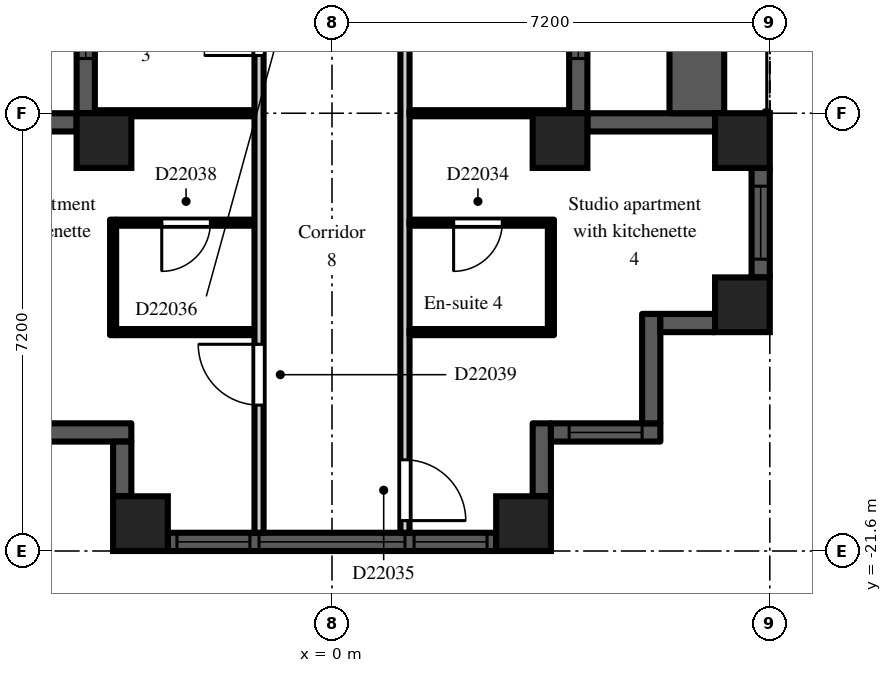
"""IFC4 building model, lengths in metres.
Left out: names, types, materials, properties, quantities, classifications, styles, units other than length and angle.
Written with IfcOpenShell. Run it as: python <this file> out.ifc"""

import sys

from ifc_helpers import new_model, si_unit, direction, frame, frame_2d, origin, origin_2d, place, context, subcontext, project, spatial, rectangle, extrude, element, fill, save


model = new_model("IFC4")
c1 = context("Model", 3, precision=1e-05, world=origin(), true_north=direction((0.0, 1.0)))
c2 = subcontext(c1, "Body", "Model", "MODEL_VIEW")
j1 = project(units=[si_unit("LENGTHUNIT", "METRE"), si_unit("PLANEANGLEUNIT", "RADIAN")], contexts=[c1])
p1 = place(None, origin())
s1 = spatial("IfcSite", under=j1, at=p1, CompositionType="ELEMENT")
p2 = place(p1, origin())
s2 = spatial("IfcBuilding", under=s1, at=p2, CompositionType="ELEMENT")
p3 = place(p2, frame((0.0, 0.0, 159.3)))
s3 = spatial("IfcBuildingStorey", under=s2, at=p3, CompositionType="ELEMENT", Elevation=159.3)
for number, where, z_axis, x_axis in (
    (1, (-3.75, -14.85, 0.0), (0.0, 0.0, 1.0), (1.0, 0.0, 0.0)),
    (2, (-3.15, -21.15, 0.0), (0.0, 0.0, 1.0), (1.0, 0.0, 0.0)),
    (3, (3.15, -21.15, 0.0), (0.0, 0.0, 1.0), (1.0, 0.0, 0.0)),
    (4, (3.75, -14.85, 0.0), (0.0, 0.0, 1.0), (1.0, 0.0, 0.0)),
    (5, (6.75, -17.55, 0.0), (0.0, 0.0, 1.0), (1.0, 0.0, 0.0)),
    (6, (6.75, -14.85, 0.0), (0.0, 0.0, 1.0), (1.0, 0.0, 0.0)),
):
    element("IfcColumn", number, at=place(p3, frame(where, z_axis=z_axis, x_axis=x_axis)), inside=s3, PredefinedType="COLUMN", context=c2, shape_type="SweptSolid", body=[
        extrude(rectangle(XDim=0.9, YDim=0.9, at=origin_2d()), origin(), (0.0, 0.0, 1.0), 3.0),
    ])
p4 = place(p3, frame((-4.05, -7.2, 0.0), z_axis=(0.0, 0.0, 1.0), x_axis=(0.0, -1.0, 0.0)))
e7 = element("IfcWall", 7, at=p4, inside=s3, PredefinedType="SOLIDWALL", context=c2, shape_type="SweptSolid", body=[
    extrude(rectangle(XDim=7.2, YDim=0.3, at=frame_2d((3.6, 0.0))), origin(), (0.0, 0.0, 1.0), 2.55),
])
p5 = place(p4, frame((3.0, 0.0, 0.0)))
e8 = element("IfcOpeningElement", 8, at=p5, cuts=e7, PredefinedType="OPENING", context=c2, shape_type="SweptSolid", body=[
    extrude(rectangle(XDim=1.2, YDim=2.05, at=frame_2d((0.6, 1.025))), frame((0.0, 0.16, 0.0), z_axis=(0.0, -1.0, 0.0), x_axis=(1.0, 0.0, 0.0)), (0.0, 0.0, 1.0), 0.32),
])
p6 = place(p4, frame((0.9, 0.0, 0.2)))
e9 = element("IfcOpeningElement", 9, at=p6, cuts=e7, PredefinedType="OPENING", context=c2, shape_type="SweptSolid", body=[
    extrude(rectangle(XDim=1.8, YDim=1.85, at=frame_2d((0.9, 0.925))), frame((0.0, 0.16, 0.0), z_axis=(0.0, -1.0, 0.0), x_axis=(1.0, 0.0, 0.0)), (0.0, 0.0, 1.0), 0.32),
])
p7 = place(p4, frame((4.5, 0.0, 0.2)))
e10 = element("IfcOpeningElement", 10, at=p7, cuts=e7, PredefinedType="OPENING", context=c2, shape_type="SweptSolid", body=[
    extrude(rectangle(XDim=1.8, YDim=1.85, at=frame_2d((0.9, 0.925))), frame((0.0, 0.16, 0.0), z_axis=(0.0, -1.0, 0.0), x_axis=(1.0, 0.0, 0.0)), (0.0, 0.0, 1.0), 0.32),
])
p8 = place(p3, frame((-4.2, -14.55, 0.0), z_axis=(0.0, 0.0, 1.0), x_axis=(-1.0, 0.0, 0.0)))
e11 = element("IfcWall", 11, at=p8, inside=s3, PredefinedType="SOLIDWALL", context=c2, shape_type="SweptSolid", body=[
    extrude(rectangle(XDim=2.1, YDim=0.3, at=frame_2d((1.05, 0.0))), origin(), (0.0, 0.0, 1.0), 2.55),
])
p9 = place(p3, frame((-5.1, -19.65, 0.0), z_axis=(0.0, 0.0, 1.0), x_axis=(1.0, 0.0, 0.0)))
e12 = element("IfcWall", 12, at=p9, inside=s3, PredefinedType="SOLIDWALL", context=c2, shape_type="SweptSolid", body=[
    extrude(rectangle(XDim=1.8, YDim=0.3, at=frame_2d((0.9, 0.0))), origin(), (0.0, 0.0, 1.0), 2.55),
])
p10 = place(p3, frame((-3.45, -19.8, 0.0), z_axis=(0.0, 0.0, 1.0), x_axis=(0.0, -1.0, 0.0)))
e13 = element("IfcWall", 13, at=p10, inside=s3, PredefinedType="SOLIDWALL", context=c2, shape_type="SweptSolid", body=[
    extrude(rectangle(XDim=0.9, YDim=0.3, at=frame_2d((0.45, 0.0))), origin(), (0.0, 0.0, 1.0), 2.55),
])
p11 = place(p3, frame((-2.7, -21.45, 0.0), z_axis=(0.0, 0.0, 1.0), x_axis=(1.0, 0.0, 0.0)))
e14 = element("IfcWall", 14, at=p11, inside=s3, PredefinedType="SOLIDWALL", context=c2, shape_type="SweptSolid", body=[
    extrude(rectangle(XDim=5.4, YDim=0.3, at=frame_2d((2.7, 0.0))), origin(), (0.0, 0.0, 1.0), 2.2),
])
p12 = place(p11, frame((1.5, 0.0, 0.2)))
e15 = element("IfcOpeningElement", 15, at=p12, cuts=e14, PredefinedType="OPENING", context=c2, shape_type="SweptSolid", body=[
    extrude(rectangle(XDim=2.4, YDim=1.85, at=frame_2d((1.2, 0.925))), frame((0.0, 0.16, 0.0), z_axis=(0.0, -1.0, 0.0), x_axis=(1.0, 0.0, 0.0)), (0.0, 0.0, 1.0), 0.32),
])
p13 = place(p11, frame((0.15, 0.0, 0.2)))
e16 = element("IfcOpeningElement", 16, at=p13, cuts=e14, PredefinedType="OPENING", context=c2, shape_type="SweptSolid", body=[
    extrude(rectangle(XDim=1.2, YDim=1.85, at=frame_2d((0.6, 0.925))), frame((0.0, 0.16, 0.0), z_axis=(0.0, -1.0, 0.0), x_axis=(1.0, 0.0, 0.0)), (0.0, 0.0, 1.0), 0.32),
])
p14 = place(p11, frame((4.05, 0.0, 0.2)))
e17 = element("IfcOpeningElement", 17, at=p14, cuts=e14, PredefinedType="OPENING", context=c2, shape_type="SweptSolid", body=[
    extrude(rectangle(XDim=1.2, YDim=1.85, at=frame_2d((0.6, 0.925))), frame((0.0, 0.16, 0.0), z_axis=(0.0, -1.0, 0.0), x_axis=(1.0, 0.0, 0.0)), (0.0, 0.0, 1.0), 0.32),
])
p15 = place(p3, frame((3.45, -20.7, 0.0), z_axis=(0.0, 0.0, 1.0), x_axis=(0.0, 1.0, 0.0)))
e18 = element("IfcWall", 18, at=p15, inside=s3, PredefinedType="SOLIDWALL", context=c2, shape_type="SweptSolid", body=[
    extrude(rectangle(XDim=1.2, YDim=0.3, at=frame_2d((0.6, 0.0))), origin(), (0.0, 0.0, 1.0), 2.55),
])
p16 = place(p3, frame((3.6, -19.65, 0.0), z_axis=(0.0, 0.0, 1.0), x_axis=(1.0, 0.0, 0.0)))
e19 = element("IfcWall", 19, at=p16, inside=s3, PredefinedType="SOLIDWALL", context=c2, shape_type="SweptSolid", body=[
    extrude(rectangle(XDim=1.8, YDim=0.3, at=frame_2d((0.9, 0.0))), origin(), (0.0, 0.0, 1.0), 2.55),
])
p17 = place(p16, frame((0.3, 0.0, 0.2)))
e20 = element("IfcOpeningElement", 20, at=p17, cuts=e19, PredefinedType="OPENING", context=c2, shape_type="SweptSolid", body=[
    extrude(rectangle(XDim=1.2, YDim=1.85, at=frame_2d((0.6, 0.925))), frame((0.0, 0.16, 0.0), z_axis=(0.0, -1.0, 0.0), x_axis=(1.0, 0.0, 0.0)), (0.0, 0.0, 1.0), 0.32),
])
p18 = place(p3, frame((5.25, -19.5, 0.0), z_axis=(0.0, 0.0, 1.0), x_axis=(0.0, 1.0, 0.0)))
e21 = element("IfcWall", 21, at=p18, inside=s3, PredefinedType="SOLIDWALL", context=c2, shape_type="SweptSolid", body=[
    extrude(rectangle(XDim=1.8, YDim=0.3, at=frame_2d((0.9, 0.0))), origin(), (0.0, 0.0, 1.0), 2.55),
])
p19 = place(p3, frame((5.4, -17.85, 0.0), z_axis=(0.0, 0.0, 1.0), x_axis=(1.0, 0.0, 0.0)))
e22 = element("IfcWall", 22, at=p19, inside=s3, PredefinedType="SOLIDWALL", context=c2, shape_type="SweptSolid", body=[
    extrude(rectangle(XDim=0.9, YDim=0.3, at=frame_2d((0.45, 0.0))), origin(), (0.0, 0.0, 1.0), 2.55),
])
p20 = place(p3, frame((7.05, -17.1, 0.0), z_axis=(0.0, 0.0, 1.0), x_axis=(0.0, 1.0, 0.0)))
e23 = element("IfcWall", 23, at=p20, inside=s3, PredefinedType="SOLIDWALL", context=c2, shape_type="SweptSolid", body=[
    extrude(rectangle(XDim=1.8, YDim=0.3, at=frame_2d((0.9, 0.0))), origin(), (0.0, 0.0, 1.0), 2.2),
])
p21 = place(p20, frame((0.3, 0.0, 0.2)))
e24 = element("IfcOpeningElement", 24, at=p21, cuts=e23, PredefinedType="OPENING", context=c2, shape_type="SweptSolid", body=[
    extrude(rectangle(XDim=1.2, YDim=1.85, at=frame_2d((0.6, 0.925))), frame((0.0, 0.16, 0.0), z_axis=(0.0, -1.0, 0.0), x_axis=(1.0, 0.0, 0.0)), (0.0, 0.0, 1.0), 0.32),
])
p22 = place(p3, frame((6.3, -14.55, 0.0), z_axis=(0.0, 0.0, 1.0), x_axis=(-1.0, 0.0, 0.0)))
e25 = element("IfcWall", 25, at=p22, inside=s3, PredefinedType="SOLIDWALL", context=c2, shape_type="SweptSolid", body=[
    extrude(rectangle(XDim=2.1, YDim=0.3, at=frame_2d((1.05, 0.0))), origin(), (0.0, 0.0, 1.0), 2.55),
])
p23 = place(p3, frame((4.05, -14.4, 0.0), z_axis=(0.0, 0.0, 1.0), x_axis=(0.0, 1.0, 0.0)))
e26 = element("IfcWall", 26, at=p23, inside=s3, PredefinedType="SOLIDWALL", context=c2, shape_type="SweptSolid", body=[
    extrude(rectangle(XDim=7.2, YDim=0.3, at=frame_2d((3.6, 0.0))), origin(), (0.0, 0.0, 1.0), 2.55),
])
p24 = place(p23, frame((3.0, 0.0, 0.0)))
e27 = element("IfcOpeningElement", 27, at=p24, cuts=e26, PredefinedType="OPENING", context=c2, shape_type="SweptSolid", body=[
    extrude(rectangle(XDim=1.2, YDim=2.05, at=frame_2d((0.6, 1.025))), frame((0.0, 0.16, 0.0), z_axis=(0.0, -1.0, 0.0), x_axis=(1.0, 0.0, 0.0)), (0.0, 0.0, 1.0), 0.32),
])
p25 = place(p23, frame((0.9, 0.0, 0.2)))
e28 = element("IfcOpeningElement", 28, at=p25, cuts=e26, PredefinedType="OPENING", context=c2, shape_type="SweptSolid", body=[
    extrude(rectangle(XDim=1.8, YDim=1.85, at=frame_2d((0.9, 0.925))), frame((0.0, 0.16, 0.0), z_axis=(0.0, -1.0, 0.0), x_axis=(1.0, 0.0, 0.0)), (0.0, 0.0, 1.0), 0.32),
])
p26 = place(p23, frame((4.5, 0.0, 0.2)))
e29 = element("IfcOpeningElement", 29, at=p26, cuts=e26, PredefinedType="OPENING", context=c2, shape_type="SweptSolid", body=[
    extrude(rectangle(XDim=1.8, YDim=1.85, at=frame_2d((0.9, 0.925))), frame((0.0, 0.16, 0.0), z_axis=(0.0, -1.0, 0.0), x_axis=(1.0, 0.0, 0.0)), (0.0, 0.0, 1.0), 0.32),
])
p27 = place(p3, frame((6.0, -14.4, 0.0), z_axis=(0.0, 0.0, 1.0), x_axis=(0.0, 1.0, 0.0)))
e30 = element("IfcWall", 30, at=p27, inside=s3, PredefinedType="PARAPET", context=c2, shape_type="SweptSolid", body=[
    extrude(rectangle(XDim=7.2, YDim=0.9, at=frame_2d((3.6, 0.0))), origin(), (0.0, 0.0, 1.0), 0.8),
])
p28 = place(p3, frame((-3.9, -14.4, 0.0), z_axis=(0.0, 0.0, 1.0), x_axis=(1.0, 0.0, 0.0)))
e31 = element("IfcWall", 31, at=p28, inside=s3, PredefinedType="PARTITIONING", context=c2, shape_type="SweptSolid", body=[
    extrude(rectangle(XDim=2.625, YDim=0.1, at=frame_2d((1.312, 0.0))), origin(), (0.0, 0.0, 1.0), 2.55),
])
p29 = place(p3, frame((-3.6, -18.05, 0.0), z_axis=(0.0, 0.0, 1.0), x_axis=(0.0, 1.0, 0.0)))
e32 = element("IfcWall", 32, at=p29, inside=s3, PredefinedType="PARTITIONING", context=c2, shape_type="SweptSolid", body=[
    extrude(rectangle(XDim=1.9, YDim=0.1, at=frame_2d((0.95, 0.0))), origin(), (0.0, 0.0, 1.0), 2.55),
])
p30 = place(p3, frame((-3.55, -18.0, 0.0), z_axis=(0.0, 0.0, 1.0), x_axis=(1.0, 0.0, 0.0)))
e33 = element("IfcWall", 33, at=p30, inside=s3, PredefinedType="PARTITIONING", context=c2, shape_type="SweptSolid", body=[
    extrude(rectangle(XDim=2.275, YDim=0.1, at=frame_2d((1.138, 0.0))), origin(), (0.0, 0.0, 1.0), 2.55),
])
p31 = place(p3, frame((-3.55, -16.2, 0.0), z_axis=(0.0, 0.0, 1.0), x_axis=(1.0, 0.0, 0.0)))
e34 = element("IfcWall", 34, at=p31, inside=s3, PredefinedType="PARTITIONING", context=c2, shape_type="SweptSolid", body=[
    extrude(rectangle(XDim=2.275, YDim=0.1, at=frame_2d((1.138, 0.0))), origin(), (0.0, 0.0, 1.0), 2.55),
])
p32 = place(p31, frame((0.75, 0.0, 0.0)))
e35 = element("IfcOpeningElement", 35, at=p32, cuts=e34, PredefinedType="OPENING", context=c2, shape_type="SweptSolid", body=[
    extrude(rectangle(XDim=0.8, YDim=2.1, at=frame_2d((0.4, 1.05))), frame((0.0, 0.06, 0.0), z_axis=(0.0, -1.0, 0.0), x_axis=(1.0, 0.0, 0.0)), (0.0, 0.0, 1.0), 0.12),
])
p33 = place(p3, frame((-1.2, -21.3, 0.0), z_axis=(0.0, 0.0, 1.0), x_axis=(0.0, 1.0, 0.0)))
e36 = element("IfcWall", 36, at=p33, inside=s3, PredefinedType="PARTITIONING", context=c2, shape_type="SweptSolid", body=[
    extrude(rectangle(XDim=14.025, YDim=0.15, at=frame_2d((7.013, 0.0))), origin(), (0.0, 0.0, 1.0), 2.55),
])
p34 = place(p33, frame((7.85, 0.0, 0.0)))
e37 = element("IfcOpeningElement", 37, at=p34, cuts=e36, PredefinedType="OPENING", context=c2, shape_type="SweptSolid", body=[
    extrude(rectangle(XDim=0.9, YDim=2.1, at=frame_2d((0.45, 1.05))), frame((0.0, 0.085, 0.0), z_axis=(0.0, -1.0, 0.0), x_axis=(1.0, 0.0, 0.0)), (0.0, 0.0, 1.0), 0.17),
])
p35 = place(p33, frame((11.45, 0.0, 0.0)))
e38 = element("IfcOpeningElement", 38, at=p35, cuts=e36, PredefinedType="OPENING", context=c2, shape_type="SweptSolid", body=[
    extrude(rectangle(XDim=0.9, YDim=2.1, at=frame_2d((0.45, 1.05))), frame((0.0, 0.085, 0.0), z_axis=(0.0, -1.0, 0.0), x_axis=(1.0, 0.0, 0.0)), (0.0, 0.0, 1.0), 0.17),
])
p36 = place(p33, frame((2.1, 0.0, 0.0)))
e39 = element("IfcOpeningElement", 39, at=p36, cuts=e36, PredefinedType="OPENING", context=c2, shape_type="SweptSolid", body=[
    extrude(rectangle(XDim=1.0, YDim=2.1, at=frame_2d((0.5, 1.05))), frame((0.0, 0.085, 0.0), z_axis=(0.0, -1.0, 0.0), x_axis=(1.0, 0.0, 0.0)), (0.0, 0.0, 1.0), 0.17),
])
p37 = place(p3, frame((1.2, -21.3, 0.0), z_axis=(0.0, 0.0, 1.0), x_axis=(0.0, 1.0, 0.0)))
e40 = element("IfcWall", 40, at=p37, inside=s3, PredefinedType="PARTITIONING", context=c2, shape_type="SweptSolid", body=[
    extrude(rectangle(XDim=14.175, YDim=0.15, at=frame_2d((7.087, 0.0))), origin(), (0.0, 0.0, 1.0), 2.55),
])
p38 = place(p37, frame((8.25, 0.0, 0.0)))
e41 = element("IfcOpeningElement", 41, at=p38, cuts=e40, PredefinedType="OPENING", context=c2, shape_type="SweptSolid", body=[
    extrude(rectangle(XDim=0.9, YDim=2.1, at=frame_2d((0.45, 1.05))), frame((0.0, 0.085, 0.0), z_axis=(0.0, -1.0, 0.0), x_axis=(1.0, 0.0, 0.0)), (0.0, 0.0, 1.0), 0.17),
])
p39 = place(p37, frame((0.2, 0.0, 0.0)))
e42 = element("IfcOpeningElement", 42, at=p39, cuts=e40, PredefinedType="OPENING", context=c2, shape_type="SweptSolid", body=[
    extrude(rectangle(XDim=1.0, YDim=2.1, at=frame_2d((0.5, 1.05))), frame((0.0, 0.085, 0.0), z_axis=(0.0, -1.0, 0.0), x_axis=(1.0, 0.0, 0.0)), (0.0, 0.0, 1.0), 0.17),
])
p40 = place(p3, frame((1.275, -18.0, 0.0), z_axis=(0.0, 0.0, 1.0), x_axis=(1.0, 0.0, 0.0)))
e43 = element("IfcWall", 43, at=p40, inside=s3, PredefinedType="PARTITIONING", context=c2, shape_type="SweptSolid", body=[
    extrude(rectangle(XDim=2.375, YDim=0.1, at=frame_2d((1.188, 0.0))), origin(), (0.0, 0.0, 1.0), 2.55),
])
p41 = place(p3, frame((1.275, -16.2, 0.0), z_axis=(0.0, 0.0, 1.0), x_axis=(1.0, 0.0, 0.0)))
e44 = element("IfcWall", 44, at=p41, inside=s3, PredefinedType="PARTITIONING", context=c2, shape_type="SweptSolid", body=[
    extrude(rectangle(XDim=2.375, YDim=0.1, at=frame_2d((1.188, 0.0))), origin(), (0.0, 0.0, 1.0), 2.55),
])
p42 = place(p41, frame((0.725, 0.0, 0.0)))
e45 = element("IfcOpeningElement", 45, at=p42, cuts=e44, PredefinedType="OPENING", context=c2, shape_type="SweptSolid", body=[
    extrude(rectangle(XDim=0.8, YDim=2.1, at=frame_2d((0.4, 1.05))), frame((0.0, 0.06, 0.0), z_axis=(0.0, -1.0, 0.0), x_axis=(1.0, 0.0, 0.0)), (0.0, 0.0, 1.0), 0.12),
])
p43 = place(p3, frame((1.275, -14.4, 0.0), z_axis=(0.0, 0.0, 1.0), x_axis=(1.0, 0.0, 0.0)))
e46 = element("IfcWall", 46, at=p43, inside=s3, PredefinedType="PARTITIONING", context=c2, shape_type="SweptSolid", body=[
    extrude(rectangle(XDim=2.625, YDim=0.1, at=frame_2d((1.312, 0.0))), origin(), (0.0, 0.0, 1.0), 2.55),
])
p44 = place(p3, frame((3.6, -17.95, 0.0), z_axis=(0.0, 0.0, 1.0), x_axis=(0.0, 1.0, 0.0)))
e47 = element("IfcWall", 47, at=p44, inside=s3, PredefinedType="PARTITIONING", context=c2, shape_type="SweptSolid", body=[
    extrude(rectangle(XDim=1.7, YDim=0.1, at=frame_2d((0.85, 0.0))), origin(), (0.0, 0.0, 1.0), 2.55),
])
p45 = place(p7, origin())
e48 = element("IfcWindow", 48, at=p45, inside=s3, PartitioningType="SINGLE_PANEL", PredefinedType="WINDOW", context=c2, shape_type="SweptSolid", body=[
    extrude(rectangle(XDim=1.8, YDim=1.85, at=frame_2d((0.9, 0.925))), frame((0.0, 0.03, 0.0), z_axis=(0.0, -1.0, 0.0), x_axis=(1.0, 0.0, 0.0)), (0.0, 0.0, 1.0), 0.06),
])
fill(e10, e48)
p46 = place(p12, origin())
e49 = element("IfcWindow", 49, at=p46, inside=s3, PartitioningType="SINGLE_PANEL", PredefinedType="WINDOW", context=c2, shape_type="SweptSolid", body=[
    extrude(rectangle(XDim=2.4, YDim=1.85, at=frame_2d((1.2, 0.925))), frame((0.0, 0.03, 0.0), z_axis=(0.0, -1.0, 0.0), x_axis=(1.0, 0.0, 0.0)), (0.0, 0.0, 1.0), 0.06),
])
fill(e15, e49)
p47 = place(p13, origin())
e50 = element("IfcWindow", 50, at=p47, inside=s3, PartitioningType="SINGLE_PANEL", PredefinedType="WINDOW", context=c2, shape_type="SweptSolid", body=[
    extrude(rectangle(XDim=1.2, YDim=1.85, at=frame_2d((0.6, 0.925))), frame((0.0, 0.03, 0.0), z_axis=(0.0, -1.0, 0.0), x_axis=(1.0, 0.0, 0.0)), (0.0, 0.0, 1.0), 0.06),
])
fill(e16, e50)
p48 = place(p14, origin())
e51 = element("IfcWindow", 51, at=p48, inside=s3, PartitioningType="SINGLE_PANEL", PredefinedType="WINDOW", context=c2, shape_type="SweptSolid", body=[
    extrude(rectangle(XDim=1.2, YDim=1.85, at=frame_2d((0.6, 0.925))), frame((0.0, 0.03, 0.0), z_axis=(0.0, -1.0, 0.0), x_axis=(1.0, 0.0, 0.0)), (0.0, 0.0, 1.0), 0.06),
])
fill(e17, e51)
p49 = place(p17, origin())
e52 = element("IfcWindow", 52, at=p49, inside=s3, PartitioningType="SINGLE_PANEL", PredefinedType="WINDOW", context=c2, shape_type="SweptSolid", body=[
    extrude(rectangle(XDim=1.2, YDim=1.85, at=frame_2d((0.6, 0.925))), frame((0.0, 0.03, 0.0), z_axis=(0.0, -1.0, 0.0), x_axis=(1.0, 0.0, 0.0)), (0.0, 0.0, 1.0), 0.06),
])
fill(e20, e52)
p50 = place(p21, origin())
e53 = element("IfcWindow", 53, at=p50, inside=s3, PartitioningType="SINGLE_PANEL", PredefinedType="WINDOW", context=c2, shape_type="SweptSolid", body=[
    extrude(rectangle(XDim=1.2, YDim=1.85, at=frame_2d((0.6, 0.925))), frame((0.0, 0.03, 0.0), z_axis=(0.0, -1.0, 0.0), x_axis=(1.0, 0.0, 0.0)), (0.0, 0.0, 1.0), 0.06),
])
fill(e24, e53)
p51 = place(p25, origin())
e54 = element("IfcWindow", 54, at=p51, inside=s3, PartitioningType="SINGLE_PANEL", PredefinedType="WINDOW", context=c2, shape_type="SweptSolid", body=[
    extrude(rectangle(XDim=1.8, YDim=1.85, at=frame_2d((0.9, 0.925))), frame((0.0, 0.03, 0.0), z_axis=(0.0, -1.0, 0.0), x_axis=(1.0, 0.0, 0.0)), (0.0, 0.0, 1.0), 0.06),
])
fill(e28, e54)
p52 = place(p42, frame((0.8, 0.0, 0.0), z_axis=(0.0, 0.0, 1.0), x_axis=(-1.0, 0.0, 0.0)))
e55 = element("IfcDoor", 55, at=p52, inside=s3, OperationType="SINGLE_SWING_RIGHT", PredefinedType="DOOR", context=c2, shape_type="SweptSolid", body=[
    extrude(rectangle(XDim=0.8, YDim=2.1, at=frame_2d((0.4, 1.05))), frame((0.0, 0.025, 0.0), z_axis=(0.0, -1.0, 0.0), x_axis=(1.0, 0.0, 0.0)), (0.0, 0.0, 1.0), 0.05),
])
fill(e45, e55)
p53 = place(p39, frame((1.0, 0.0, 0.0), z_axis=(0.0, 0.0, 1.0), x_axis=(-1.0, 0.0, 0.0)))
e56 = element("IfcDoor", 56, at=p53, inside=s3, OperationType="SINGLE_SWING_RIGHT", PredefinedType="DOOR", context=c2, shape_type="SweptSolid", body=[
    extrude(rectangle(XDim=1.0, YDim=2.1, at=frame_2d((0.5, 1.05))), frame((0.0, 0.025, 0.0), z_axis=(0.0, -1.0, 0.0), x_axis=(1.0, 0.0, 0.0)), (0.0, 0.0, 1.0), 0.05),
])
fill(e42, e56)
p54 = place(p34, origin())
e57 = element("IfcDoor", 57, at=p54, inside=s3, OperationType="SINGLE_SWING_LEFT", PredefinedType="DOOR", context=c2, shape_type="SweptSolid", body=[
    extrude(rectangle(XDim=0.9, YDim=2.1, at=frame_2d((0.45, 1.05))), frame((0.0, 0.025, 0.0), z_axis=(0.0, -1.0, 0.0), x_axis=(1.0, 0.0, 0.0)), (0.0, 0.0, 1.0), 0.05),
])
fill(e37, e57)
p55 = place(p32, frame((0.8, 0.0, 0.0), z_axis=(0.0, 0.0, 1.0), x_axis=(-1.0, 0.0, 0.0)))
e58 = element("IfcDoor", 58, at=p55, inside=s3, OperationType="SINGLE_SWING_RIGHT", PredefinedType="DOOR", context=c2, shape_type="SweptSolid", body=[
    extrude(rectangle(XDim=0.8, YDim=2.1, at=frame_2d((0.4, 1.05))), frame((0.0, 0.025, 0.0), z_axis=(0.0, -1.0, 0.0), x_axis=(1.0, 0.0, 0.0)), (0.0, 0.0, 1.0), 0.05),
])
fill(e35, e58)
p56 = place(p36, origin())
e59 = element("IfcDoor", 59, at=p56, inside=s3, OperationType="SINGLE_SWING_RIGHT", PredefinedType="DOOR", context=c2, shape_type="SweptSolid", body=[
    extrude(rectangle(XDim=1.0, YDim=2.1, at=frame_2d((0.5, 1.05))), frame((0.0, 0.025, 0.0), z_axis=(0.0, -1.0, 0.0), x_axis=(1.0, 0.0, 0.0)), (0.0, 0.0, 1.0), 0.05),
])
fill(e39, e59)
save(model, sys.argv[1])
